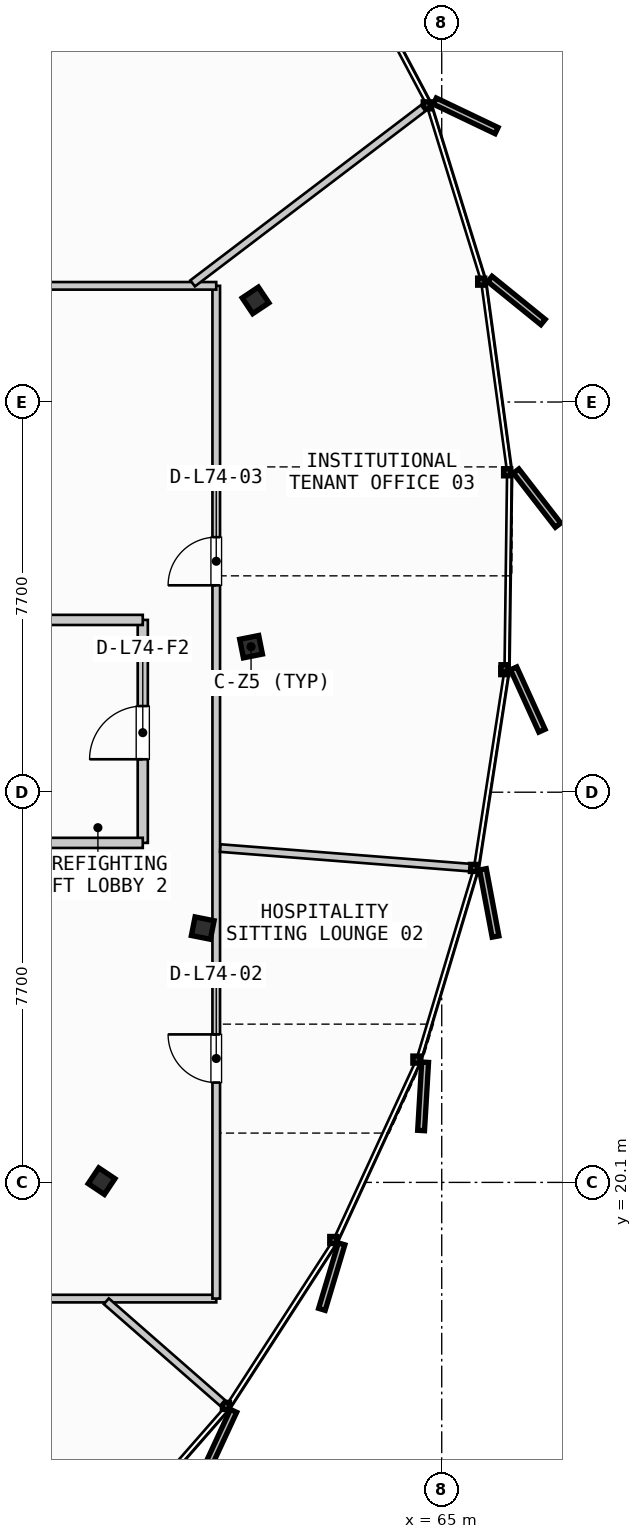
"""IFC4 building model, lengths in metres.
Left out: names, types, materials, properties, quantities, classifications, styles, units other than length and angle.
Written with IfcOpenShell. Run it as: python <this file> out.ifc"""

import sys

from ifc_helpers import new_model, si_unit, direction, frame, frame_2d, origin, origin_2d, place, context, subcontext, project, spatial, rectangle, i_section, extrude, source, transform, mapped, element, fill, save


model = new_model("IFC4")
c1 = context("Model", 3, precision=1e-05, world=origin(), true_north=direction((0.0, 1.0)))
c2 = subcontext(c1, "Body", "Model", "MODEL_VIEW")
j1 = project(units=[si_unit("LENGTHUNIT", "METRE"), si_unit("PLANEANGLEUNIT", "RADIAN")], contexts=[c1])
p1 = place(None, origin())
s1 = spatial("IfcSite", under=j1, at=p1, CompositionType="ELEMENT")
p2 = place(p1, origin())
s2 = spatial("IfcBuilding", under=s1, at=p2, CompositionType="ELEMENT")
p3 = place(p2, frame((0.0, 0.0, 280.15)))
s3 = spatial("IfcBuildingStorey", under=s2, at=p3, CompositionType="ELEMENT", Elevation=280.15)
m1 = source(origin(), c2, "Body", "SweptSolid", [
    extrude(i_section(OverallWidth=0.374, OverallDepth=0.383, WebThickness=0.017, FlangeThickness=0.026, FilletRadius=0.015, at=origin_2d()), origin(), (0.0, 0.0, 1.0), 3.21),
])
for number, where, z_axis, x_axis in (
    (1, (61.237, 30.672, 0.0), (0.0, 0.0, 1.0), (0.981, 0.195, 0.0)),
    (2, (61.326, 37.506, 0.0), (0.0, 0.0, 1.0), (0.831, 0.556, 0.0)),
    (3, (58.287, 20.125, 0.0), (0.0, 0.0, 1.0), (0.831, -0.556, 0.0)),
    (4, (60.284, 25.118, 0.0), (0.0, 0.0, 1.0), (0.981, -0.195, 0.0)),
):
    element("IfcColumn", number, at=place(p3, frame(where, z_axis=z_axis, x_axis=x_axis)), inside=s3, PredefinedType="COLUMN", context=c2, shape_type="MappedRepresentation", body=[
        mapped(m1, transform((0.0, 0.0, 0.0), scale=1.0)),
    ])
p4 = place(p3, frame((59.1, 26.8, 0.0), z_axis=(0.0, 0.0, 1.0), x_axis=(0.0, 1.0, 0.0)))
e5 = element("IfcWall", 5, at=p4, inside=s3, PredefinedType="PARTITIONING", context=c2, shape_type="SweptSolid", body=[
    extrude(rectangle(XDim=4.4, YDim=0.2, at=frame_2d((2.2, 0.0))), origin(), (0.0, 0.0, 1.0), 2.455),
])
p5 = place(p4, frame((1.65, 0.0, 0.0)))
e6 = element("IfcOpeningElement", 6, at=p5, cuts=e5, PredefinedType="OPENING", context=c2, shape_type="SweptSolid", body=[
    extrude(rectangle(XDim=1.05, YDim=2.15, at=frame_2d((0.525, 1.075))), frame((0.0, 0.11, 0.0), z_axis=(0.0, -1.0, 0.0), x_axis=(1.0, 0.0, 0.0)), (0.0, 0.0, 1.0), 0.22),
])
for number, where, z_axis, x_axis in (
    (7, (55.835, 26.8, 0.0), (0.0, 0.0, 1.0), (1.0, 0.0, 0.0)),
    (8, (55.835, 31.2, 0.0), (0.0, 0.0, 1.0), (1.0, 0.0, 0.0)),
):
    element("IfcWall", number, at=place(p3, frame(where, z_axis=z_axis, x_axis=x_axis)), inside=s3, PredefinedType="PARTITIONING", context=c2, shape_type="SweptSolid", body=[
        extrude(rectangle(XDim=3.265, YDim=0.2, at=frame_2d((1.633, 0.0))), origin(), (0.0, 0.0, 1.0), 2.455),
    ])
p6 = place(p3, frame((31.68, 17.807, 0.0), z_axis=(0.0, 0.0, 1.0), x_axis=(1.0, 0.0, 0.0)))
e9 = element("IfcWall", 9, at=p6, inside=s3, PredefinedType="PARTITIONING", context=c2, shape_type="SweptSolid", body=[
    extrude(rectangle(XDim=28.87, YDim=0.15, at=frame_2d((14.435, 0.0))), origin(), (0.0, 0.0, 1.0), 2.455),
])
p7 = place(p6, frame((13.209, 0.0, 0.0)))
e10 = element("IfcOpeningElement", 10, at=p7, cuts=e9, PredefinedType="OPENING", context=c2, shape_type="SweptSolid", body=[
    extrude(rectangle(XDim=0.95, YDim=2.15, at=frame_2d((0.475, 1.075))), frame((0.0, 0.085, 0.0), z_axis=(0.0, -1.0, 0.0), x_axis=(1.0, 0.0, 0.0)), (0.0, 0.0, 1.0), 0.17),
])
p8 = place(p3, frame((60.55, 17.807, 0.0), z_axis=(0.0, 0.0, 1.0), x_axis=(0.0, 1.0, 0.0)))
e11 = element("IfcWall", 11, at=p8, inside=s3, PredefinedType="PARTITIONING", context=c2, shape_type="SweptSolid", body=[
    extrude(rectangle(XDim=19.986, YDim=0.15, at=frame_2d((9.993, 0.0))), origin(), (0.0, 0.0, 1.0), 2.455),
])
p9 = place(p8, frame((4.263, 0.0, 0.0)))
e12 = element("IfcOpeningElement", 12, at=p9, cuts=e11, PredefinedType="OPENING", context=c2, shape_type="SweptSolid", body=[
    extrude(rectangle(XDim=0.95, YDim=2.15, at=frame_2d((0.475, 1.075))), frame((0.0, 0.085, 0.0), z_axis=(0.0, -1.0, 0.0), x_axis=(1.0, 0.0, 0.0)), (0.0, 0.0, 1.0), 0.17),
])
p10 = place(p8, frame((14.076, 0.0, 0.0)))
e13 = element("IfcOpeningElement", 13, at=p10, cuts=e11, PredefinedType="OPENING", context=c2, shape_type="SweptSolid", body=[
    extrude(rectangle(XDim=0.95, YDim=2.15, at=frame_2d((0.475, 1.075))), frame((0.0, 0.085, 0.0), z_axis=(0.0, -1.0, 0.0), x_axis=(1.0, 0.0, 0.0)), (0.0, 0.0, 1.0), 0.17),
])
p11 = place(p3, frame((60.55, 37.793, 0.0), z_axis=(0.0, 0.0, 1.0), x_axis=(-1.0, 0.0, 0.0)))
e14 = element("IfcWall", 14, at=p11, inside=s3, PredefinedType="PARTITIONING", context=c2, shape_type="SweptSolid", body=[
    extrude(rectangle(XDim=28.87, YDim=0.15, at=frame_2d((14.435, 0.0))), origin(), (0.0, 0.0, 1.0), 2.455),
])
p12 = place(p11, frame((6.281, 0.0, 0.0)))
e15 = element("IfcOpeningElement", 15, at=p12, cuts=e14, PredefinedType="OPENING", context=c2, shape_type="SweptSolid", body=[
    extrude(rectangle(XDim=0.95, YDim=2.15, at=frame_2d((0.475, 1.075))), frame((0.0, 0.085, 0.0), z_axis=(0.0, -1.0, 0.0), x_axis=(1.0, 0.0, 0.0)), (0.0, 0.0, 1.0), 0.17),
])
p13 = place(p11, frame((20.135, 0.0, 0.0)))
e16 = element("IfcOpeningElement", 16, at=p13, cuts=e14, PredefinedType="OPENING", context=c2, shape_type="SweptSolid", body=[
    extrude(rectangle(XDim=0.95, YDim=2.15, at=frame_2d((0.475, 1.075))), frame((0.0, 0.085, 0.0), z_axis=(0.0, -1.0, 0.0), x_axis=(1.0, 0.0, 0.0)), (0.0, 0.0, 1.0), 0.17),
])
p14 = place(p3, frame((58.381, 17.754, 0.0), z_axis=(0.0, 0.0, 1.0), x_axis=(0.752546906109, -0.658538650426, 0.0)))
e17 = element("IfcWall", 17, at=p14, inside=s3, PredefinedType="PARTITIONING", context=c2, shape_type="SweptSolid", body=[
    extrude(rectangle(XDim=3.046, YDim=0.15, at=frame_2d((1.523, 0.0))), origin(), (0.0, 0.0, 1.0), 2.455),
])
p15 = place(p3, frame((60.63, 26.698, 0.0), z_axis=(0.0, 0.0, 1.0), x_axis=(0.996950475178, -0.078036850545, 0.0)))
e18 = element("IfcWall", 18, at=p15, inside=s3, PredefinedType="PARTITIONING", context=c2, shape_type="SweptSolid", body=[
    extrude(rectangle(XDim=4.931, YDim=0.15, at=frame_2d((2.465, 0.0))), origin(), (0.0, 0.0, 1.0), 2.455),
])
p16 = place(p3, frame((60.084, 37.841, 0.0), z_axis=(0.0, 0.0, 1.0), x_axis=(0.796092215945, 0.605175333033, 0.0)))
e19 = element("IfcWall", 19, at=p16, inside=s3, PredefinedType="PARTITIONING", context=c2, shape_type="SweptSolid", body=[
    extrude(rectangle(XDim=5.715, YDim=0.15, at=frame_2d((2.857, 0.0))), origin(), (0.0, 0.0, 1.0), 2.455),
])
m2 = source(origin(), c2, "Body", "SweptSolid", [
    extrude(rectangle(XDim=1.05, YDim=2.15, at=frame_2d((0.525, 1.075))), frame((0.0, 0.025, 0.0), z_axis=(0.0, -1.0, 0.0), x_axis=(1.0, 0.0, 0.0)), (0.0, 0.0, 1.0), 0.05),
])
p17 = place(p5, origin())
e20 = element("IfcDoor", 20, at=p17, inside=s3, OperationType="SINGLE_SWING_LEFT", PredefinedType="DOOR", context=c2, shape_type="MappedRepresentation", body=[
    mapped(m2, transform((0.0, 0.0, 0.0), scale=1.0)),
])
fill(e6, e20)
m3 = source(origin(), c2, "Body", "SweptSolid", [
    extrude(rectangle(XDim=0.95, YDim=2.15, at=frame_2d((0.475, 1.075))), frame((0.0, 0.025, 0.0), z_axis=(0.0, -1.0, 0.0), x_axis=(1.0, 0.0, 0.0)), (0.0, 0.0, 1.0), 0.05),
])
p18 = place(p9, origin())
e21 = element("IfcDoor", 21, at=p18, inside=s3, OperationType="SINGLE_SWING_RIGHT", PredefinedType="DOOR", context=c2, shape_type="MappedRepresentation", body=[
    mapped(m3, transform((0.0, 0.0, 0.0), scale=1.0)),
])
fill(e12, e21)
p19 = place(p10, origin())
e22 = element("IfcDoor", 22, at=p19, inside=s3, OperationType="SINGLE_SWING_LEFT", PredefinedType="DOOR", context=c2, shape_type="MappedRepresentation", body=[
    mapped(m3, transform((0.0, 0.0, 0.0), scale=1.0)),
])
fill(e13, e22)
save(model, sys.argv[1])
